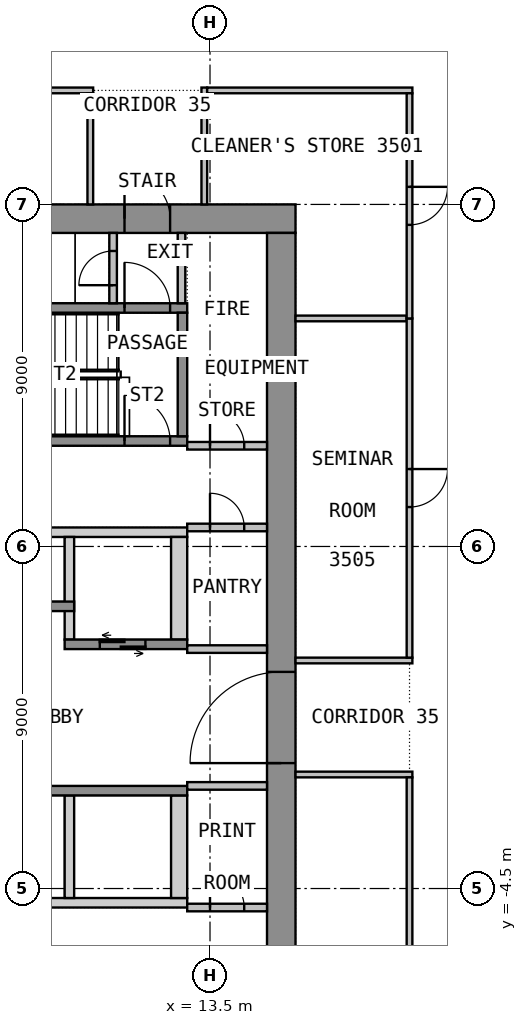
"""IFC4 building model, lengths in metres.
Left out: names, types, materials, properties, quantities, classifications, styles, units other than length and angle.
Written with IfcOpenShell. Run it as: python <this file> out.ifc"""

import sys

from ifc_helpers import new_model, si_unit, direction, frame, frame_2d, origin, place, context, subcontext, project, spatial, polyline, rectangle, outline, extrude, element, fill, save


model = new_model("IFC4")
c1 = context("Model", 3, precision=1e-05, world=origin(), true_north=direction((0.0, 1.0)))
c2 = subcontext(c1, "Body", "Model", "MODEL_VIEW")
j1 = project(units=[si_unit("LENGTHUNIT", "METRE"), si_unit("PLANEANGLEUNIT", "RADIAN")], contexts=[c1])
p1 = place(None, origin())
s1 = spatial("IfcSite", under=j1, at=p1, CompositionType="ELEMENT")
p2 = place(p1, origin())
s2 = spatial("IfcBuilding", under=s1, at=p2, CompositionType="ELEMENT")
p3 = place(p2, frame((0.0, 0.0, 144.3)))
s3 = spatial("IfcBuildingStorey", under=s2, at=p3, CompositionType="ELEMENT", Elevation=144.3)
p4 = place(p3, frame((-15.75, 13.125, 0.0), z_axis=(0.0, 0.0, 1.0), x_axis=(1.0, 0.0, 0.0)))
e1 = element("IfcWall", 1, at=p4, inside=s3, PredefinedType="SHEAR", context=c2, shape_type="SweptSolid", body=[
    extrude(rectangle(XDim=31.5, YDim=0.75, at=frame_2d((15.75, 0.0))), origin(), (0.0, 0.0, 1.0), 3.575),
])
p5 = place(p4, frame((14.55, 0.0, 0.0)))
e2 = element("IfcOpeningElement", 2, at=p5, cuts=e1, PredefinedType="OPENING", context=c2, shape_type="SweptSolid", body=[
    extrude(rectangle(XDim=2.4, YDim=2.1, at=frame_2d((1.2, 1.05))), frame((0.0, 0.385, 0.0), z_axis=(0.0, -1.0, 0.0), x_axis=(1.0, 0.0, 0.0)), (0.0, 0.0, 1.0), 0.77),
])
p6 = place(p4, frame((3.3, 0.0, 0.0)))
e3 = element("IfcOpeningElement", 3, at=p6, cuts=e1, PredefinedType="OPENING", context=c2, shape_type="SweptSolid", body=[
    extrude(rectangle(XDim=1.2, YDim=2.1, at=frame_2d((0.6, 1.05))), frame((0.0, 0.385, 0.0), z_axis=(0.0, -1.0, 0.0), x_axis=(1.0, 0.0, 0.0)), (0.0, 0.0, 1.0), 0.77),
])
p7 = place(p4, frame((27.0, 0.0, 0.0)))
e4 = element("IfcOpeningElement", 4, at=p7, cuts=e1, PredefinedType="OPENING", context=c2, shape_type="SweptSolid", body=[
    extrude(rectangle(XDim=1.2, YDim=2.1, at=frame_2d((0.6, 1.05))), frame((0.0, 0.385, 0.0), z_axis=(0.0, -1.0, 0.0), x_axis=(1.0, 0.0, 0.0)), (0.0, 0.0, 1.0), 0.77),
])
p8 = place(p3, frame((15.375, -12.75, 0.0), z_axis=(0.0, 0.0, 1.0), x_axis=(0.0, 1.0, 0.0)))
e5 = element("IfcWall", 5, at=p8, inside=s3, PredefinedType="SHEAR", context=c2, shape_type="SweptSolid", body=[
    extrude(rectangle(XDim=25.5, YDim=0.75, at=frame_2d((12.75, 0.0))), origin(), (0.0, 0.0, 1.0), 3.575),
])
p9 = place(p8, frame((11.55, 0.0, 0.0)))
e6 = element("IfcOpeningElement", 6, at=p9, cuts=e5, PredefinedType="OPENING", context=c2, shape_type="SweptSolid", body=[
    extrude(rectangle(XDim=2.4, YDim=2.1, at=frame_2d((1.2, 1.05))), frame((0.0, 0.385, 0.0), z_axis=(0.0, -1.0, 0.0), x_axis=(1.0, 0.0, 0.0)), (0.0, 0.0, 1.0), 0.77),
])
p10 = place(p3, origin())
e7 = element("IfcWall", 7, at=p10, inside=s3, PredefinedType="SHEAR", context=c2, shape_type="SweptSolid", body=[
    extrude(outline(polyline([(4.075, 4.75), (12.9, 4.75), (12.9, 5.0), (4.075, 5.0), (4.075, 4.75)])), origin(), (0.0, 0.0, 1.0), 3.575),
])
p11 = place(p3, origin())
e8 = element("IfcWall", 8, at=p11, inside=s3, PredefinedType="SHEAR", context=c2, shape_type="SweptSolid", body=[
    extrude(outline(polyline([(9.675, 2.05), (9.925, 2.05), (9.925, 4.75), (9.675, 4.75), (9.675, 2.05)])), origin(), (0.0, 0.0, 1.0), 3.575),
])
p12 = place(p3, origin())
e9 = element("IfcWall", 9, at=p12, inside=s3, PredefinedType="SHEAR", context=c2, shape_type="SweptSolid", body=[
    extrude(outline(polyline([(12.475, 2.05), (12.9, 2.05), (12.9, 4.75), (12.475, 4.75), (12.475, 2.05)])), origin(), (0.0, 0.0, 1.0), 3.575),
])
p13 = place(p3, frame((4.075, 2.925, 0.0), z_axis=(0.0, 0.0, 1.0), x_axis=(1.0, 0.0, 0.0)))
e10 = element("IfcWall", 10, at=p13, inside=s3, PredefinedType="SHEAR", context=c2, shape_type="SweptSolid", body=[
    extrude(rectangle(XDim=5.85, YDim=0.25, at=frame_2d((2.925, 0.0))), origin(), (0.0, 0.0, 1.0), 3.575),
])
p14 = place(p13, frame((0.925, 0.0, 0.0)))
e11 = element("IfcOpeningElement", 11, at=p14, cuts=e10, PredefinedType="OPENING", context=c2, shape_type="SweptSolid", body=[
    extrude(rectangle(XDim=1.2, YDim=2.1, at=frame_2d((0.6, 1.05))), frame((0.0, 0.135, 0.0), z_axis=(0.0, -1.0, 0.0), x_axis=(1.0, 0.0, 0.0)), (0.0, 0.0, 1.0), 0.27),
])
p15 = place(p13, frame((3.725, 0.0, 0.0)))
e12 = element("IfcOpeningElement", 12, at=p15, cuts=e10, PredefinedType="OPENING", context=c2, shape_type="SweptSolid", body=[
    extrude(rectangle(XDim=1.2, YDim=2.1, at=frame_2d((0.6, 1.05))), frame((0.0, 0.135, 0.0), z_axis=(0.0, -1.0, 0.0), x_axis=(1.0, 0.0, 0.0)), (0.0, 0.0, 1.0), 0.27),
])
p16 = place(p3, frame((9.675, 1.925, 0.0), z_axis=(0.0, 0.0, 1.0), x_axis=(1.0, 0.0, 0.0)))
e13 = element("IfcWall", 13, at=p16, inside=s3, PredefinedType="SHEAR", context=c2, shape_type="SweptSolid", body=[
    extrude(rectangle(XDim=3.225, YDim=0.25, at=frame_2d((1.612, 0.0))), origin(), (0.0, 0.0, 1.0), 3.575),
])
p17 = place(p16, frame((0.925, 0.0, 0.0)))
e14 = element("IfcOpeningElement", 14, at=p17, cuts=e13, PredefinedType="OPENING", context=c2, shape_type="SweptSolid", body=[
    extrude(rectangle(XDim=1.2, YDim=2.1, at=frame_2d((0.6, 1.05))), frame((0.0, 0.135, 0.0), z_axis=(0.0, -1.0, 0.0), x_axis=(1.0, 0.0, 0.0)), (0.0, 0.0, 1.0), 0.27),
])
p18 = place(p3, origin())
e15 = element("IfcWall", 15, at=p18, inside=s3, PredefinedType="SHEAR", context=c2, shape_type="SweptSolid", body=[
    extrude(outline(polyline([(-1.525, -5.0), (12.9, -5.0), (12.9, -4.75), (-1.525, -4.75), (-1.525, -5.0)])), origin(), (0.0, 0.0, 1.0), 3.575),
])
p19 = place(p3, origin())
e16 = element("IfcWall", 16, at=p19, inside=s3, PredefinedType="SHEAR", context=c2, shape_type="SweptSolid", body=[
    extrude(outline(polyline([(9.675, -4.75), (9.925, -4.75), (9.925, -2.05), (9.675, -2.05), (9.675, -4.75)])), origin(), (0.0, 0.0, 1.0), 3.575),
])
p20 = place(p3, origin())
e17 = element("IfcWall", 17, at=p20, inside=s3, PredefinedType="SHEAR", context=c2, shape_type="SweptSolid", body=[
    extrude(outline(polyline([(12.475, -4.75), (12.9, -4.75), (12.9, -2.05), (12.475, -2.05), (12.475, -4.75)])), origin(), (0.0, 0.0, 1.0), 3.575),
])
p21 = place(p3, frame((-1.525, -1.925, 0.0), z_axis=(0.0, 0.0, 1.0), x_axis=(1.0, 0.0, 0.0)))
e18 = element("IfcWall", 18, at=p21, inside=s3, PredefinedType="SHEAR", context=c2, shape_type="SweptSolid", body=[
    extrude(rectangle(XDim=14.425, YDim=0.25, at=frame_2d((7.212, 0.0))), origin(), (0.0, 0.0, 1.0), 3.575),
])
p22 = place(p21, frame((0.925, 0.0, 0.0)))
e19 = element("IfcOpeningElement", 19, at=p22, cuts=e18, PredefinedType="OPENING", context=c2, shape_type="SweptSolid", body=[
    extrude(rectangle(XDim=1.2, YDim=2.1, at=frame_2d((0.6, 1.05))), frame((0.0, 0.135, 0.0), z_axis=(0.0, -1.0, 0.0), x_axis=(1.0, 0.0, 0.0)), (0.0, 0.0, 1.0), 0.27),
])
p23 = place(p21, frame((3.725, 0.0, 0.0)))
e20 = element("IfcOpeningElement", 20, at=p23, cuts=e18, PredefinedType="OPENING", context=c2, shape_type="SweptSolid", body=[
    extrude(rectangle(XDim=1.2, YDim=2.1, at=frame_2d((0.6, 1.05))), frame((0.0, 0.135, 0.0), z_axis=(0.0, -1.0, 0.0), x_axis=(1.0, 0.0, 0.0)), (0.0, 0.0, 1.0), 0.27),
])
p24 = place(p3, frame((2.8, 7.275, 0.0), z_axis=(0.0, 0.0, 1.0), x_axis=(1.0, 0.0, 0.0)))
e21 = element("IfcWall", 21, at=p24, inside=s3, PredefinedType="SHEAR", context=c2, shape_type="SweptSolid", body=[
    extrude(rectangle(XDim=10.1, YDim=0.25, at=frame_2d((5.05, 0.0))), origin(), (0.0, 0.0, 1.0), 3.575),
])
p25 = place(p24, frame((8.45, 0.0, 0.0)))
e22 = element("IfcOpeningElement", 22, at=p25, cuts=e21, PredefinedType="OPENING", context=c2, shape_type="SweptSolid", body=[
    extrude(rectangle(XDim=1.2, YDim=2.1, at=frame_2d((0.6, 1.05))), frame((0.0, 0.135, 0.0), z_axis=(0.0, -1.0, 0.0), x_axis=(1.0, 0.0, 0.0)), (0.0, 0.0, 1.0), 0.27),
])
p26 = place(p3, frame((2.8, 10.775, 0.0), z_axis=(0.0, 0.0, 1.0), x_axis=(1.0, 0.0, 0.0)))
e23 = element("IfcWall", 23, at=p26, inside=s3, PredefinedType="SHEAR", context=c2, shape_type="SweptSolid", body=[
    extrude(rectangle(XDim=10.1, YDim=0.25, at=frame_2d((5.05, 0.0))), origin(), (0.0, 0.0, 1.0), 3.575),
])
p27 = place(p26, frame((8.45, 0.0, 0.0)))
e24 = element("IfcOpeningElement", 24, at=p27, cuts=e23, PredefinedType="OPENING", context=c2, shape_type="SweptSolid", body=[
    extrude(rectangle(XDim=1.2, YDim=2.1, at=frame_2d((0.6, 1.05))), frame((0.0, 0.135, 0.0), z_axis=(0.0, -1.0, 0.0), x_axis=(1.0, 0.0, 0.0)), (0.0, 0.0, 1.0), 0.27),
])
p28 = place(p3, frame((12.775, 7.4, 0.0), z_axis=(0.0, 0.0, 1.0), x_axis=(0.0, 1.0, 0.0)))
e25 = element("IfcWall", 25, at=p28, inside=s3, PredefinedType="SHEAR", context=c2, shape_type="SweptSolid", body=[
    extrude(rectangle(XDim=3.25, YDim=0.25, at=frame_2d((1.625, 0.0))), origin(), (0.0, 0.0, 1.0), 3.575),
])
p29 = place(p3, frame((12.75, 10.9, 0.0), z_axis=(0.0, 0.0, 1.0), x_axis=(0.0, 1.0, 0.0)))
e26 = element("IfcWall", 26, at=p29, inside=s3, PredefinedType="PARTITIONING", context=c2, shape_type="SweptSolid", body=[
    extrude(rectangle(XDim=1.85, YDim=0.2, at=frame_2d((0.925, 0.0))), origin(), (0.0, 0.0, 1.0), 3.575),
])
p30 = place(p3, frame((10.95, 10.9, 0.0), z_axis=(0.0, 0.0, 1.0), x_axis=(0.0, 1.0, 0.0)))
e27 = element("IfcWall", 27, at=p30, inside=s3, PredefinedType="PARTITIONING", context=c2, shape_type="SweptSolid", body=[
    extrude(rectangle(XDim=1.85, YDim=0.2, at=frame_2d((0.925, 0.0))), origin(), (0.0, 0.0, 1.0), 3.575),
])
p31 = place(p30, frame((0.475, 0.0, 0.0)))
e28 = element("IfcOpeningElement", 28, at=p31, cuts=e27, PredefinedType="OPENING", context=c2, shape_type="SweptSolid", body=[
    extrude(rectangle(XDim=0.9, YDim=2.1, at=frame_2d((0.45, 1.05))), frame((0.0, 0.11, 0.0), z_axis=(0.0, -1.0, 0.0), x_axis=(1.0, 0.0, 0.0)), (0.0, 0.0, 1.0), 0.22),
])
p32 = place(p3, frame((12.9, 7.15, 0.0), z_axis=(0.0, 0.0, 1.0), x_axis=(1.0, 0.0, 0.0)))
e29 = element("IfcWall", 29, at=p32, inside=s3, PredefinedType="PARTITIONING", context=c2, shape_type="SweptSolid", body=[
    extrude(rectangle(XDim=2.1, YDim=0.2, at=frame_2d((1.05, 0.0))), origin(), (0.0, 0.0, 1.0), 3.575),
])
p33 = place(p32, frame((0.6, 0.0, 0.0)))
e30 = element("IfcOpeningElement", 30, at=p33, cuts=e29, PredefinedType="OPENING", context=c2, shape_type="SweptSolid", body=[
    extrude(rectangle(XDim=0.9, YDim=2.1, at=frame_2d((0.45, 1.05))), frame((0.0, 0.11, 0.0), z_axis=(0.0, -1.0, 0.0), x_axis=(1.0, 0.0, 0.0)), (0.0, 0.0, 1.0), 0.22),
])
p34 = place(p3, frame((12.9, 5.0, 0.0), z_axis=(0.0, 0.0, 1.0), x_axis=(1.0, 0.0, 0.0)))
e31 = element("IfcWall", 31, at=p34, inside=s3, PredefinedType="PARTITIONING", context=c2, shape_type="SweptSolid", body=[
    extrude(rectangle(XDim=2.1, YDim=0.2, at=frame_2d((1.05, 0.0))), origin(), (0.0, 0.0, 1.0), 3.575),
])
p35 = place(p34, frame((0.6, 0.0, 0.0)))
e32 = element("IfcOpeningElement", 32, at=p35, cuts=e31, PredefinedType="OPENING", context=c2, shape_type="SweptSolid", body=[
    extrude(rectangle(XDim=0.9, YDim=2.1, at=frame_2d((0.45, 1.05))), frame((0.0, 0.11, 0.0), z_axis=(0.0, -1.0, 0.0), x_axis=(1.0, 0.0, 0.0)), (0.0, 0.0, 1.0), 0.22),
])
p36 = place(p3, frame((12.9, 1.8, 0.0), z_axis=(0.0, 0.0, 1.0), x_axis=(1.0, 0.0, 0.0)))
e33 = element("IfcWall", 33, at=p36, inside=s3, PredefinedType="PARTITIONING", context=c2, shape_type="SweptSolid", body=[
    extrude(rectangle(XDim=2.1, YDim=0.2, at=frame_2d((1.05, 0.0))), origin(), (0.0, 0.0, 1.0), 3.575),
])
p37 = place(p3, frame((12.9, -5.0, 0.0), z_axis=(0.0, 0.0, 1.0), x_axis=(1.0, 0.0, 0.0)))
e34 = element("IfcWall", 34, at=p37, inside=s3, PredefinedType="PARTITIONING", context=c2, shape_type="SweptSolid", body=[
    extrude(rectangle(XDim=2.1, YDim=0.2, at=frame_2d((1.05, 0.0))), origin(), (0.0, 0.0, 1.0), 3.575),
])
p38 = place(p37, frame((0.6, 0.0, 0.0)))
e35 = element("IfcOpeningElement", 35, at=p38, cuts=e34, PredefinedType="OPENING", context=c2, shape_type="SweptSolid", body=[
    extrude(rectangle(XDim=0.9, YDim=2.1, at=frame_2d((0.45, 1.05))), frame((0.0, 0.11, 0.0), z_axis=(0.0, -1.0, 0.0), x_axis=(1.0, 0.0, 0.0)), (0.0, 0.0, 1.0), 0.22),
])
p39 = place(p3, frame((12.9, -1.8, 0.0), z_axis=(0.0, 0.0, 1.0), x_axis=(1.0, 0.0, 0.0)))
e36 = element("IfcWall", 36, at=p39, inside=s3, PredefinedType="PARTITIONING", context=c2, shape_type="SweptSolid", body=[
    extrude(rectangle(XDim=2.1, YDim=0.2, at=frame_2d((1.05, 0.0))), origin(), (0.0, 0.0, 1.0), 3.575),
])
p40 = place(p3, frame((1.575, 16.5, 0.0), z_axis=(0.0, 0.0, 1.0), x_axis=(1.0, 0.0, 0.0)))
e37 = element("IfcWall", 37, at=p40, inside=s3, PredefinedType="PARTITIONING", context=c2, shape_type="SweptSolid", body=[
    extrude(rectangle(XDim=8.85, YDim=0.15, at=frame_2d((4.425, 0.0))), origin(), (0.0, 0.0, 1.0), 3.575),
])
p41 = place(p40, frame((3.925, 0.0, 0.0)))
e38 = element("IfcOpeningElement", 38, at=p41, cuts=e37, PredefinedType="OPENING", context=c2, shape_type="SweptSolid", body=[
    extrude(rectangle(XDim=1.0, YDim=2.1, at=frame_2d((0.5, 1.05))), frame((0.0, 0.085, 0.0), z_axis=(0.0, -1.0, 0.0), x_axis=(1.0, 0.0, 0.0)), (0.0, 0.0, 1.0), 0.17),
])
p42 = place(p3, frame((10.35, 16.425, 0.0), z_axis=(0.0, 0.0, 1.0), x_axis=(0.0, -1.0, 0.0)))
e39 = element("IfcWall", 39, at=p42, inside=s3, PredefinedType="PARTITIONING", context=c2, shape_type="SweptSolid", body=[
    extrude(rectangle(XDim=2.925, YDim=0.15, at=frame_2d((1.462, 0.0))), origin(), (0.0, 0.0, 1.0), 3.575),
])
p43 = place(p3, frame((13.35, 13.5, 0.0), z_axis=(0.0, 0.0, 1.0), x_axis=(0.0, 1.0, 0.0)))
e40 = element("IfcWall", 40, at=p43, inside=s3, PredefinedType="PARTITIONING", context=c2, shape_type="SweptSolid", body=[
    extrude(rectangle(XDim=3.075, YDim=0.15, at=frame_2d((1.538, 0.0))), origin(), (0.0, 0.0, 1.0), 3.575),
])
p44 = place(p3, frame((13.425, 16.5, 0.0), z_axis=(0.0, 0.0, 1.0), x_axis=(1.0, 0.0, 0.0)))
e41 = element("IfcWall", 41, at=p44, inside=s3, PredefinedType="PARTITIONING", context=c2, shape_type="SweptSolid", body=[
    extrude(rectangle(XDim=5.4, YDim=0.15, at=frame_2d((2.7, 0.0))), origin(), (0.0, 0.0, 1.0), 3.575),
])
for number, where, z_axis, x_axis in (
    (42, (15.75, -1.5, 0.0), (0.0, 0.0, 1.0), (1.0, 0.0, 0.0)),
    (43, (18.825, 1.5, 0.0), (0.0, 0.0, 1.0), (-1.0, 0.0, 0.0)),
):
    element("IfcWall", number, at=place(p3, frame(where, z_axis=z_axis, x_axis=x_axis)), inside=s3, PredefinedType="PARTITIONING", context=c2, shape_type="SweptSolid", body=[
        extrude(rectangle(XDim=3.075, YDim=0.15, at=frame_2d((1.538, 0.0))), origin(), (0.0, 0.0, 1.0), 3.575),
    ])
p45 = place(p3, frame((18.675, 10.5, 0.0), z_axis=(0.0, 0.0, 1.0), x_axis=(-1.0, 0.0, 0.0)))
e44 = element("IfcWall", 44, at=p45, inside=s3, PredefinedType="PARTITIONING", context=c2, shape_type="SweptSolid", body=[
    extrude(rectangle(XDim=2.925, YDim=0.15, at=frame_2d((1.462, 0.0))), origin(), (0.0, 0.0, 1.0), 3.575),
])
p46 = place(p3, frame((18.75, -1.575, 0.0), z_axis=(0.0, 0.0, 1.0), x_axis=(0.0, -1.0, 0.0)))
e45 = element("IfcWall", 45, at=p46, inside=s3, PredefinedType="PARTITIONING", context=c2, shape_type="SweptSolid", body=[
    extrude(rectangle(XDim=11.925, YDim=0.15, at=frame_2d((5.962, 0.0))), origin(), (0.0, 0.0, 1.0), 3.575),
])
p47 = place(p46, frame((5.462, 0.0, 0.0)))
e46 = element("IfcOpeningElement", 46, at=p47, cuts=e45, PredefinedType="OPENING", context=c2, shape_type="SweptSolid", body=[
    extrude(rectangle(XDim=1.0, YDim=2.1, at=frame_2d((0.5, 1.05))), frame((0.0, 0.085, 0.0), z_axis=(0.0, -1.0, 0.0), x_axis=(1.0, 0.0, 0.0)), (0.0, 0.0, 1.0), 0.17),
])
p48 = place(p3, frame((18.75, 10.5, 0.0), z_axis=(0.0, 0.0, 1.0), x_axis=(0.0, -1.0, 0.0)))
e47 = element("IfcWall", 47, at=p48, inside=s3, PredefinedType="PARTITIONING", context=c2, shape_type="SweptSolid", body=[
    extrude(rectangle(XDim=8.925, YDim=0.15, at=frame_2d((4.462, 0.0))), origin(), (0.0, 0.0, 1.0), 3.575),
])
p49 = place(p48, frame((3.962, 0.0, 0.0)))
e48 = element("IfcOpeningElement", 48, at=p49, cuts=e47, PredefinedType="OPENING", context=c2, shape_type="SweptSolid", body=[
    extrude(rectangle(XDim=1.0, YDim=2.1, at=frame_2d((0.5, 1.05))), frame((0.0, 0.085, 0.0), z_axis=(0.0, -1.0, 0.0), x_axis=(1.0, 0.0, 0.0)), (0.0, 0.0, 1.0), 0.17),
])
p50 = place(p3, frame((18.75, 16.425, 0.0), z_axis=(0.0, 0.0, 1.0), x_axis=(0.0, -1.0, 0.0)))
e49 = element("IfcWall", 49, at=p50, inside=s3, PredefinedType="PARTITIONING", context=c2, shape_type="SweptSolid", body=[
    extrude(rectangle(XDim=5.925, YDim=0.15, at=frame_2d((2.962, 0.0))), origin(), (0.0, 0.0, 1.0), 3.575),
])
p51 = place(p50, frame((2.462, 0.0, 0.0)))
e50 = element("IfcOpeningElement", 50, at=p51, cuts=e49, PredefinedType="OPENING", context=c2, shape_type="SweptSolid", body=[
    extrude(rectangle(XDim=1.0, YDim=2.1, at=frame_2d((0.5, 1.05))), frame((0.0, 0.085, 0.0), z_axis=(0.0, -1.0, 0.0), x_axis=(1.0, 0.0, 0.0)), (0.0, 0.0, 1.0), 0.17),
])
p52 = place(p9, origin())
e51 = element("IfcDoor", 51, at=p52, inside=s3, OperationType="DOUBLE_DOOR_DOUBLE_SWING", PredefinedType="DOOR", context=c2, shape_type="SweptSolid", body=[
    extrude(rectangle(XDim=2.4, YDim=2.1, at=frame_2d((1.2, 1.05))), frame((0.0, 0.025, 0.0), z_axis=(0.0, -1.0, 0.0), x_axis=(1.0, 0.0, 0.0)), (0.0, 0.0, 1.0), 0.05),
])
fill(e6, e51)
p53 = place(p7, origin())
e52 = element("IfcDoor", 52, at=p53, inside=s3, OperationType="SINGLE_SWING_RIGHT", PredefinedType="DOOR", context=c2, shape_type="SweptSolid", body=[
    extrude(rectangle(XDim=1.2, YDim=2.1, at=frame_2d((0.6, 1.05))), frame((0.0, 0.025, 0.0), z_axis=(0.0, -1.0, 0.0), x_axis=(1.0, 0.0, 0.0)), (0.0, 0.0, 1.0), 0.05),
])
fill(e4, e52)
p54 = place(p17, origin())
e53 = element("IfcDoor", 53, at=p54, inside=s3, OperationType="DOUBLE_DOOR_SLIDING", PredefinedType="DOOR", context=c2, shape_type="SweptSolid", body=[
    extrude(rectangle(XDim=1.2, YDim=2.1, at=frame_2d((0.6, 1.05))), frame((0.0, 0.025, 0.0), z_axis=(0.0, -1.0, 0.0), x_axis=(1.0, 0.0, 0.0)), (0.0, 0.0, 1.0), 0.05),
])
fill(e14, e53)
p55 = place(p25, origin())
e54 = element("IfcDoor", 54, at=p55, inside=s3, OperationType="SINGLE_SWING_LEFT", PredefinedType="DOOR", context=c2, shape_type="SweptSolid", body=[
    extrude(rectangle(XDim=1.2, YDim=2.1, at=frame_2d((0.6, 1.05))), frame((0.0, 0.025, 0.0), z_axis=(0.0, -1.0, 0.0), x_axis=(1.0, 0.0, 0.0)), (0.0, 0.0, 1.0), 0.05),
])
fill(e22, e54)
p56 = place(p27, origin())
e55 = element("IfcDoor", 55, at=p56, inside=s3, OperationType="SINGLE_SWING_RIGHT", PredefinedType="DOOR", context=c2, shape_type="SweptSolid", body=[
    extrude(rectangle(XDim=1.2, YDim=2.1, at=frame_2d((0.6, 1.05))), frame((0.0, 0.025, 0.0), z_axis=(0.0, -1.0, 0.0), x_axis=(1.0, 0.0, 0.0)), (0.0, 0.0, 1.0), 0.05),
])
fill(e24, e55)
p57 = place(p31, origin())
e56 = element("IfcDoor", 56, at=p57, inside=s3, OperationType="SINGLE_SWING_LEFT", PredefinedType="DOOR", context=c2, shape_type="SweptSolid", body=[
    extrude(rectangle(XDim=0.9, YDim=2.1, at=frame_2d((0.45, 1.05))), frame((0.0, 0.025, 0.0), z_axis=(0.0, -1.0, 0.0), x_axis=(1.0, 0.0, 0.0)), (0.0, 0.0, 1.0), 0.05),
])
fill(e28, e56)
p58 = place(p33, origin())
e57 = element("IfcDoor", 57, at=p58, inside=s3, OperationType="SINGLE_SWING_LEFT", PredefinedType="DOOR", context=c2, shape_type="SweptSolid", body=[
    extrude(rectangle(XDim=0.9, YDim=2.1, at=frame_2d((0.45, 1.05))), frame((0.0, 0.025, 0.0), z_axis=(0.0, -1.0, 0.0), x_axis=(1.0, 0.0, 0.0)), (0.0, 0.0, 1.0), 0.05),
])
fill(e30, e57)
p59 = place(p35, origin())
e58 = element("IfcDoor", 58, at=p59, inside=s3, OperationType="SINGLE_SWING_LEFT", PredefinedType="DOOR", context=c2, shape_type="SweptSolid", body=[
    extrude(rectangle(XDim=0.9, YDim=2.1, at=frame_2d((0.45, 1.05))), frame((0.0, 0.025, 0.0), z_axis=(0.0, -1.0, 0.0), x_axis=(1.0, 0.0, 0.0)), (0.0, 0.0, 1.0), 0.05),
])
fill(e32, e58)
p60 = place(p38, origin())
e59 = element("IfcDoor", 59, at=p60, inside=s3, OperationType="SINGLE_SWING_LEFT", PredefinedType="DOOR", context=c2, shape_type="SweptSolid", body=[
    extrude(rectangle(XDim=0.9, YDim=2.1, at=frame_2d((0.45, 1.05))), frame((0.0, 0.025, 0.0), z_axis=(0.0, -1.0, 0.0), x_axis=(1.0, 0.0, 0.0)), (0.0, 0.0, 1.0), 0.05),
])
fill(e35, e59)
p61 = place(p51, origin())
e60 = element("IfcDoor", 60, at=p61, inside=s3, OperationType="SINGLE_SWING_RIGHT", PredefinedType="DOOR", context=c2, shape_type="SweptSolid", body=[
    extrude(rectangle(XDim=1.0, YDim=2.1, at=frame_2d((0.5, 1.05))), frame((0.0, 0.025, 0.0), z_axis=(0.0, -1.0, 0.0), x_axis=(1.0, 0.0, 0.0)), (0.0, 0.0, 1.0), 0.05),
])
fill(e50, e60)
p62 = place(p49, origin())
e61 = element("IfcDoor", 61, at=p62, inside=s3, OperationType="SINGLE_SWING_RIGHT", PredefinedType="DOOR", context=c2, shape_type="SweptSolid", body=[
    extrude(rectangle(XDim=1.0, YDim=2.1, at=frame_2d((0.5, 1.05))), frame((0.0, 0.025, 0.0), z_axis=(0.0, -1.0, 0.0), x_axis=(1.0, 0.0, 0.0)), (0.0, 0.0, 1.0), 0.05),
])
fill(e48, e61)
save(model, sys.argv[1])
